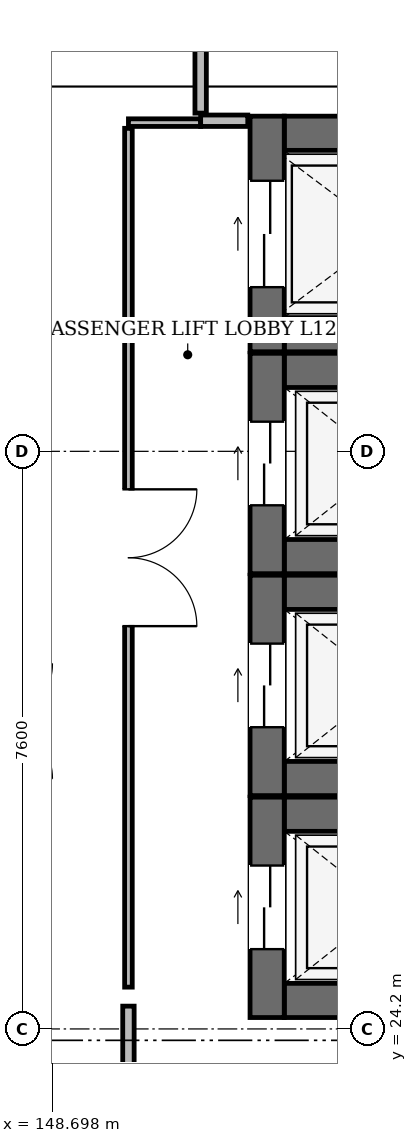
"""IFC4 building model, lengths in metres.
Left out: names, types, materials, properties, quantities, classifications, styles, units other than length and angle.
Written with IfcOpenShell. Run it as: python <this file> out.ifc"""

import sys

from ifc_helpers import new_model, si_unit, direction, frame, frame_2d, origin, place, context, subcontext, project, spatial, rectangle, extrude, element, fill, save


model = new_model("IFC4")
c1 = context("Model", 3, precision=1e-05, world=origin(), true_north=direction((0.0, 1.0)))
c2 = subcontext(c1, "Body", "Model", "MODEL_VIEW")
j1 = project(units=[si_unit("LENGTHUNIT", "METRE"), si_unit("PLANEANGLEUNIT", "RADIAN")], contexts=[c1])
p1 = place(None, origin())
s1 = spatial("IfcSite", under=j1, at=p1, CompositionType="ELEMENT")
p2 = place(p1, origin())
s2 = spatial("IfcBuilding", under=s1, at=p2, CompositionType="ELEMENT")
p3 = place(p2, frame((0.0, 0.0, 53.4)))
s3 = spatial("IfcBuildingStorey", under=s2, at=p3, CompositionType="ELEMENT", Elevation=53.4)
for number, where, z_axis, x_axis in (
    (1, (151.75, 24.575, 0.0), (0.0, 0.0, 1.0), (1.0, 0.0, 0.0)),
    (2, (151.75, 27.025, 0.0), (0.0, 0.0, 1.0), (1.0, 0.0, 0.0)),
):
    element("IfcWall", number, at=place(p3, frame(where, z_axis=z_axis, x_axis=x_axis)), inside=s3, PredefinedType="SHEAR", context=c2, shape_type="SweptSolid", body=[
        extrude(rectangle(XDim=2.7, YDim=0.45, at=frame_2d((1.35, 0.0))), origin(), (0.0, 0.0, 1.0), 3.96),
    ])
p4 = place(p3, frame((151.525, 24.35, 0.0), z_axis=(0.0, 0.0, 1.0), x_axis=(0.0, 1.0, 0.0)))
e3 = element("IfcWall", 3, at=p4, inside=s3, PredefinedType="SHEAR", context=c2, shape_type="SweptSolid", body=[
    extrude(rectangle(XDim=2.9, YDim=0.45, at=frame_2d((1.45, 0.0))), origin(), (0.0, 0.0, 1.0), 3.96),
])
p5 = place(p4, frame((0.9, 0.0, 0.0)))
e4 = element("IfcOpeningElement", 4, at=p5, cuts=e3, PredefinedType="OPENING", context=c2, shape_type="SweptSolid", body=[
    extrude(rectangle(XDim=1.1, YDim=2.2, at=frame_2d((0.55, 1.1))), frame((0.0, 0.237, 0.0), z_axis=(0.0, -1.0, 0.0), x_axis=(1.0, 0.0, 0.0)), (0.0, 0.0, 1.0), 0.474),
])
for number, where, z_axis, x_axis in (
    (5, (151.75, 27.495, 0.0), (0.0, 0.0, 1.0), (1.0, 0.0, 0.0)),
    (6, (151.75, 29.945, 0.0), (0.0, 0.0, 1.0), (1.0, 0.0, 0.0)),
):
    element("IfcWall", number, at=place(p3, frame(where, z_axis=z_axis, x_axis=x_axis)), inside=s3, PredefinedType="SHEAR", context=c2, shape_type="SweptSolid", body=[
        extrude(rectangle(XDim=2.7, YDim=0.45, at=frame_2d((1.35, 0.0))), origin(), (0.0, 0.0, 1.0), 3.96),
    ])
p6 = place(p3, frame((151.525, 27.27, 0.0), z_axis=(0.0, 0.0, 1.0), x_axis=(0.0, 1.0, 0.0)))
e7 = element("IfcWall", 7, at=p6, inside=s3, PredefinedType="SHEAR", context=c2, shape_type="SweptSolid", body=[
    extrude(rectangle(XDim=2.9, YDim=0.45, at=frame_2d((1.45, 0.0))), origin(), (0.0, 0.0, 1.0), 3.96),
])
p7 = place(p6, frame((0.9, 0.0, 0.0)))
e8 = element("IfcOpeningElement", 8, at=p7, cuts=e7, PredefinedType="OPENING", context=c2, shape_type="SweptSolid", body=[
    extrude(rectangle(XDim=1.1, YDim=2.2, at=frame_2d((0.55, 1.1))), frame((0.0, 0.237, 0.0), z_axis=(0.0, -1.0, 0.0), x_axis=(1.0, 0.0, 0.0)), (0.0, 0.0, 1.0), 0.474),
])
for number, where, z_axis, x_axis in (
    (9, (151.75, 30.415, 0.0), (0.0, 0.0, 1.0), (1.0, 0.0, 0.0)),
    (10, (151.75, 32.865, 0.0), (0.0, 0.0, 1.0), (1.0, 0.0, 0.0)),
):
    element("IfcWall", number, at=place(p3, frame(where, z_axis=z_axis, x_axis=x_axis)), inside=s3, PredefinedType="SHEAR", context=c2, shape_type="SweptSolid", body=[
        extrude(rectangle(XDim=2.7, YDim=0.45, at=frame_2d((1.35, 0.0))), origin(), (0.0, 0.0, 1.0), 3.96),
    ])
p8 = place(p3, frame((151.525, 30.19, 0.0), z_axis=(0.0, 0.0, 1.0), x_axis=(0.0, 1.0, 0.0)))
e11 = element("IfcWall", 11, at=p8, inside=s3, PredefinedType="SHEAR", context=c2, shape_type="SweptSolid", body=[
    extrude(rectangle(XDim=2.9, YDim=0.45, at=frame_2d((1.45, 0.0))), origin(), (0.0, 0.0, 1.0), 3.96),
])
p9 = place(p8, frame((0.9, 0.0, 0.0)))
e12 = element("IfcOpeningElement", 12, at=p9, cuts=e11, PredefinedType="OPENING", context=c2, shape_type="SweptSolid", body=[
    extrude(rectangle(XDim=1.1, YDim=2.2, at=frame_2d((0.55, 1.1))), frame((0.0, 0.237, 0.0), z_axis=(0.0, -1.0, 0.0), x_axis=(1.0, 0.0, 0.0)), (0.0, 0.0, 1.0), 0.474),
])
for number, where, z_axis, x_axis in (
    (13, (151.75, 33.335, 0.0), (0.0, 0.0, 1.0), (1.0, 0.0, 0.0)),
    (14, (151.75, 35.985, 0.0), (0.0, 0.0, 1.0), (1.0, 0.0, 0.0)),
):
    element("IfcWall", number, at=place(p3, frame(where, z_axis=z_axis, x_axis=x_axis)), inside=s3, PredefinedType="SHEAR", context=c2, shape_type="SweptSolid", body=[
        extrude(rectangle(XDim=2.7, YDim=0.45, at=frame_2d((1.35, 0.0))), origin(), (0.0, 0.0, 1.0), 3.96),
    ])
p10 = place(p3, frame((151.525, 33.11, 0.0), z_axis=(0.0, 0.0, 1.0), x_axis=(0.0, 1.0, 0.0)))
e15 = element("IfcWall", 15, at=p10, inside=s3, PredefinedType="SHEAR", context=c2, shape_type="SweptSolid", body=[
    extrude(rectangle(XDim=3.1, YDim=0.45, at=frame_2d((1.55, 0.0))), origin(), (0.0, 0.0, 1.0), 3.96),
])
p11 = place(p10, frame((0.85, 0.0, 0.0)))
e16 = element("IfcOpeningElement", 16, at=p11, cuts=e15, PredefinedType="OPENING", context=c2, shape_type="SweptSolid", body=[
    extrude(rectangle(XDim=1.4, YDim=2.3, at=frame_2d((0.7, 1.15))), frame((0.0, 0.237, 0.0), z_axis=(0.0, -1.0, 0.0), x_axis=(1.0, 0.0, 0.0)), (0.0, 0.0, 1.0), 0.474),
])
p12 = place(p3, frame((149.7, 24.75, 0.0), z_axis=(0.0, 0.0, 1.0), x_axis=(0.0, 1.0, 0.0)))
e17 = element("IfcWall", 17, at=p12, inside=s3, PredefinedType="PARTITIONING", context=c2, shape_type="SweptSolid", body=[
    extrude(rectangle(XDim=11.3, YDim=0.1, at=frame_2d((5.65, 0.0))), origin(), (0.0, 0.0, 1.0), 3.805),
])
p13 = place(p12, frame((4.75, 0.0, 0.0)))
e18 = element("IfcOpeningElement", 18, at=p13, cuts=e17, PredefinedType="OPENING", context=c2, shape_type="SweptSolid", body=[
    extrude(rectangle(XDim=1.8, YDim=2.4, at=frame_2d((0.9, 1.2))), frame((0.0, 0.062, 0.0), z_axis=(0.0, -1.0, 0.0), x_axis=(1.0, 0.0, 0.0)), (0.0, 0.0, 1.0), 0.124),
])
p14 = place(p3, frame((149.7, 36.125, 0.0), z_axis=(0.0, 0.0, 1.0), x_axis=(1.0, 0.0, 0.0)))
e19 = element("IfcWall", 19, at=p14, inside=s3, PredefinedType="PARTITIONING", context=c2, shape_type="SweptSolid", body=[
    extrude(rectangle(XDim=0.95, YDim=0.1, at=frame_2d((0.475, 0.0))), origin(), (0.0, 0.0, 1.0), 3.805),
])
p15 = place(p3, frame((150.65, 36.15, 0.0), z_axis=(0.0, 0.0, 1.0), x_axis=(1.0, 0.0, 0.0)))
e20 = element("IfcWall", 20, at=p15, inside=s3, PredefinedType="PARTITIONING", context=c2, shape_type="SweptSolid", body=[
    extrude(rectangle(XDim=0.62, YDim=0.15, at=frame_2d((0.31, 0.0))), origin(), (0.0, 0.0, 1.0), 3.805),
])
p16 = place(p3, frame((149.7, 24.5, 0.0), z_axis=(0.0, 0.0, 1.0), x_axis=(0.0, -1.0, 0.0)))
e21 = element("IfcWall", 21, at=p16, inside=s3, PredefinedType="PARTITIONING", context=c2, shape_type="SweptSolid", body=[
    extrude(rectangle(XDim=0.8, YDim=0.15, at=frame_2d((0.4, 0.0))), origin(), (0.0, 0.0, 1.0), 3.805),
])
p17 = place(p3, frame((150.65, 54.6, 0.0), z_axis=(0.0, 0.0, 1.0), x_axis=(0.0, -1.0, 0.0)))
e22 = element("IfcWall", 22, at=p17, inside=s3, PredefinedType="PARTITIONING", context=c2, shape_type="SweptSolid", body=[
    extrude(rectangle(XDim=18.35, YDim=0.15, at=frame_2d((9.175, 0.0))), origin(), (0.0, 0.0, 1.0), 3.805),
])
p18 = place(p17, frame((8.475, 0.0, 0.0)))
e23 = element("IfcOpeningElement", 23, at=p18, cuts=e22, PredefinedType="OPENING", context=c2, shape_type="SweptSolid", body=[
    extrude(rectangle(XDim=1.4, YDim=2.2, at=frame_2d((0.7, 1.1))), frame((0.0, 0.087, 0.0), z_axis=(0.0, -1.0, 0.0), x_axis=(1.0, 0.0, 0.0)), (0.0, 0.0, 1.0), 0.174),
])
p19 = place(p5, origin())
e24 = element("IfcDoor", 24, at=p19, inside=s3, OperationType="DOUBLE_DOOR_SLIDING", PredefinedType="DOOR", context=c2, shape_type="SweptSolid", body=[
    extrude(rectangle(XDim=1.1, YDim=2.2, at=frame_2d((0.55, 1.1))), frame((0.0, 0.025, 0.0), z_axis=(0.0, -1.0, 0.0), x_axis=(1.0, 0.0, 0.0)), (0.0, 0.0, 1.0), 0.05),
])
fill(e4, e24)
p20 = place(p7, origin())
e25 = element("IfcDoor", 25, at=p20, inside=s3, OperationType="DOUBLE_DOOR_SLIDING", PredefinedType="DOOR", context=c2, shape_type="SweptSolid", body=[
    extrude(rectangle(XDim=1.1, YDim=2.2, at=frame_2d((0.55, 1.1))), frame((0.0, 0.025, 0.0), z_axis=(0.0, -1.0, 0.0), x_axis=(1.0, 0.0, 0.0)), (0.0, 0.0, 1.0), 0.05),
])
fill(e8, e25)
p21 = place(p9, origin())
e26 = element("IfcDoor", 26, at=p21, inside=s3, OperationType="DOUBLE_DOOR_SLIDING", PredefinedType="DOOR", context=c2, shape_type="SweptSolid", body=[
    extrude(rectangle(XDim=1.1, YDim=2.2, at=frame_2d((0.55, 1.1))), frame((0.0, 0.025, 0.0), z_axis=(0.0, -1.0, 0.0), x_axis=(1.0, 0.0, 0.0)), (0.0, 0.0, 1.0), 0.05),
])
fill(e12, e26)
p22 = place(p11, origin())
e27 = element("IfcDoor", 27, at=p22, inside=s3, OperationType="DOUBLE_DOOR_SLIDING", PredefinedType="DOOR", context=c2, shape_type="SweptSolid", body=[
    extrude(rectangle(XDim=1.4, YDim=2.3, at=frame_2d((0.7, 1.15))), frame((0.0, 0.025, 0.0), z_axis=(0.0, -1.0, 0.0), x_axis=(1.0, 0.0, 0.0)), (0.0, 0.0, 1.0), 0.05),
])
fill(e16, e27)
p23 = place(p13, frame((1.8, 0.0, 0.0), z_axis=(0.0, 0.0, 1.0), x_axis=(-1.0, 0.0, 0.0)))
e28 = element("IfcDoor", 28, at=p23, inside=s3, OperationType="DOUBLE_DOOR_SINGLE_SWING", PredefinedType="DOOR", context=c2, shape_type="SweptSolid", body=[
    extrude(rectangle(XDim=1.8, YDim=2.4, at=frame_2d((0.9, 1.2))), frame((0.0, 0.025, 0.0), z_axis=(0.0, -1.0, 0.0), x_axis=(1.0, 0.0, 0.0)), (0.0, 0.0, 1.0), 0.05),
])
fill(e18, e28)
save(model, sys.argv[1])
